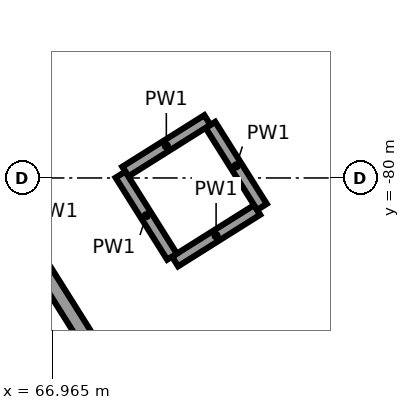
"""IFC4 building model, lengths in metres.
Left out: names, types, materials, properties, quantities, classifications, styles, units other than length and angle.
Written with IfcOpenShell. Run it as: python <this file> out.ifc"""

import sys

from ifc_helpers import new_model, si_unit, direction, frame, frame_2d, origin, place, context, subcontext, project, spatial, rectangle, extrude, element, save


model = new_model("IFC4")
c1 = context("Model", 3, precision=1e-05, world=origin(), true_north=direction((0.0, 1.0)))
c2 = subcontext(c1, "Body", "Model", "MODEL_VIEW")
j1 = project(units=[si_unit("LENGTHUNIT", "METRE"), si_unit("PLANEANGLEUNIT", "RADIAN")], contexts=[c1])
p1 = place(None, origin())
s1 = spatial("IfcSite", under=j1, at=p1, CompositionType="ELEMENT")
p2 = place(p1, origin())
s2 = spatial("IfcBuilding", under=s1, at=p2, CompositionType="ELEMENT")
p3 = place(p2, frame((0.0, 0.0, 12.0)))
s3 = spatial("IfcBuildingStorey", under=s2, at=p3, CompositionType="ELEMENT", Elevation=12.0)
p4 = place(p3, frame((67.437, -82.143, 0.0), z_axis=(0.0, 0.0, 1.0), x_axis=(-0.532038212918, 0.84672034344, 0.0)))
e1 = element("IfcWall", 1, at=p4, inside=s3, PredefinedType="SHEAR", context=c2, shape_type="SweptSolid", body=[
    extrude(rectangle(XDim=3.0, YDim=0.2, at=frame_2d((1.5, 0.0))), origin(), (0.0, 0.0, 1.0), 5.65),
])
for number, where, z_axis, x_axis in (
    (2, (68.582, -81.099, 0.0), (0.0, 0.0, 1.0), (0.847, 0.532, 0.0)),
    (3, (69.725, -80.381, 0.0), (0.0, 0.0, 1.0), (-0.532, 0.847, 0.0)),
):
    element("IfcWall", number, at=place(p3, frame(where, z_axis=z_axis, x_axis=x_axis)), inside=s3, PredefinedType="PARTITIONING", context=c2, shape_type="SweptSolid", body=[
        extrude(rectangle(XDim=1.275, YDim=0.15, at=frame_2d((0.638, 0.0))), origin(), (0.0, 0.0, 1.0), 5.65),
    ])
for number, where, z_axis, x_axis in (
    (4, (69.007, -79.238, 0.0), (0.0, 0.0, 1.0), (-0.847, -0.532, 0.0)),
    (5, (67.864, -79.956, 0.0), (0.0, 0.0, 1.0), (0.532, -0.847, 0.0)),
):
    element("IfcWall", number, at=place(p3, frame(where, z_axis=z_axis, x_axis=x_axis)), inside=s3, PredefinedType="PARTITIONING", context=c2, shape_type="SweptSolid", body=[
        extrude(rectangle(XDim=1.275, YDim=0.15, at=frame_2d((0.637, 0.0))), origin(), (0.0, 0.0, 1.0), 5.65),
    ])
p5 = place(p3, frame((72.143, -78.552, 0.0), z_axis=(0.0, 0.0, 1.0), x_axis=(-0.532063867314, 0.846704222913, 0.0)))
e6 = element("IfcWall", 6, at=p5, inside=s3, PredefinedType="PARTITIONING", context=c2, shape_type="SweptSolid", body=[
    extrude(rectangle(XDim=5.108, YDim=0.15, at=frame_2d((2.554, 0.0))), origin(), (0.0, 0.0, 1.0), 4.55),
])
p6 = place(p5, frame((3.15, 0.0, 0.0)))
e7 = element("IfcOpeningElement", 7, at=p6, cuts=e6, PredefinedType="OPENING", context=c2, shape_type="SweptSolid", body=[
    extrude(rectangle(XDim=1.8, YDim=2.1, at=frame_2d((0.9, 1.05))), frame((0.0, 0.085, 0.0), z_axis=(0.0, -1.0, 0.0), x_axis=(1.0, 0.0, 0.0)), (0.0, 0.0, 1.0), 0.17),
])
p7 = place(p5, frame((0.05, 0.0, 0.0)))
e8 = element("IfcOpeningElement", 8, at=p7, cuts=e6, PredefinedType="OPENING", context=c2, shape_type="SweptSolid", body=[
    extrude(rectangle(XDim=1.8, YDim=2.1, at=frame_2d((0.9, 1.05))), frame((0.0, 0.085, 0.0), z_axis=(0.0, -1.0, 0.0), x_axis=(1.0, 0.0, 0.0)), (0.0, 0.0, 1.0), 0.17),
])
save(model, sys.argv[1])
